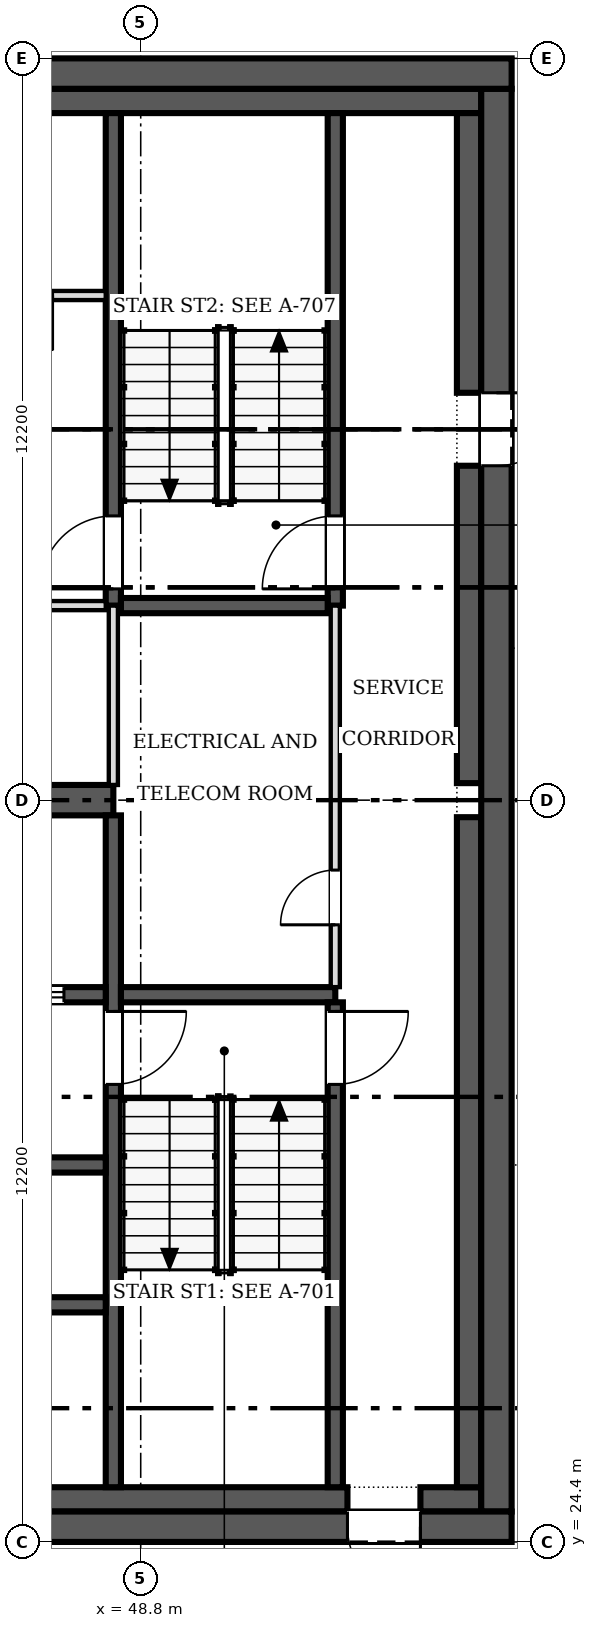
"""IFC4 building model, lengths in metres.
Left out: names, types, materials, properties, quantities, classifications, styles, units other than length and angle.
Written with IfcOpenShell. Run it as: python <this file> out.ifc"""

import sys

from ifc_helpers import new_model, si_unit, direction, frame, frame_2d, origin, place, context, subcontext, project, spatial, rectangle, extrude, source, transform, mapped, element, fill, save


model = new_model("IFC4")
c1 = context("Model", 3, precision=1e-05, world=origin(), true_north=direction((0.0, 1.0)))
c2 = subcontext(c1, "Body", "Model", "MODEL_VIEW")
j1 = project(units=[si_unit("LENGTHUNIT", "METRE"), si_unit("PLANEANGLEUNIT", "RADIAN")], contexts=[c1])
p1 = place(None, origin())
s1 = spatial("IfcSite", under=j1, at=p1, CompositionType="ELEMENT")
p2 = place(p1, origin())
s2 = spatial("IfcBuilding", under=s1, at=p2, CompositionType="ELEMENT")
p3 = place(p2, frame((0.0, 0.0, 216.9)))
s3 = spatial("IfcBuildingStorey", under=s2, at=p3, CompositionType="ELEMENT", Elevation=216.9)
p4 = place(p3, frame((54.9, 24.65, 0.0), z_axis=(0.0, 0.0, 1.0), x_axis=(-1.0, 0.0, 0.0)))
e1 = element("IfcWall", 1, at=p4, inside=s3, PredefinedType="SHEAR", context=c2, shape_type="SweptSolid", body=[
    extrude(rectangle(XDim=24.4, YDim=0.5, at=frame_2d((12.2, 0.0))), origin(), (0.0, 0.0, 1.0), 3.8),
])
m1 = source(origin(), c2, "Body", "SweptSolid", [
    extrude(rectangle(XDim=1.2, YDim=2.1, at=frame_2d((0.6, 1.05))), frame((0.0, 0.26, 0.0), z_axis=(0.0, -1.0, 0.0), x_axis=(1.0, 0.0, 0.0)), (0.0, 0.0, 1.0), 0.52),
])
p5 = place(p4, frame((1.5, 0.0, 0.0)))
e2 = element("IfcOpeningElement", 2, at=p5, cuts=e1, PredefinedType="OPENING", context=c2, shape_type="MappedRepresentation", body=[
    mapped(m1, transform((0.0, 0.0, 0.0), scale=1.0)),
])
p6 = place(p3, frame((30.5, 48.55, 0.0), z_axis=(0.0, 0.0, 1.0), x_axis=(1.0, 0.0, 0.0)))
e3 = element("IfcWall", 3, at=p6, inside=s3, PredefinedType="SHEAR", context=c2, shape_type="SweptSolid", body=[
    extrude(rectangle(XDim=24.4, YDim=0.5, at=frame_2d((12.2, 0.0))), origin(), (0.0, 0.0, 1.0), 3.8),
])
p7 = place(p3, frame((54.65, 48.3, 0.0), z_axis=(0.0, 0.0, 1.0), x_axis=(0.0, -1.0, 0.0)))
e4 = element("IfcWall", 4, at=p7, inside=s3, PredefinedType="SHEAR", context=c2, shape_type="SweptSolid", body=[
    extrude(rectangle(XDim=23.4, YDim=0.5, at=frame_2d((11.7, 0.0))), origin(), (0.0, 0.0, 1.0), 3.8),
])
p8 = place(p7, frame((5.0, 0.0, 0.0)))
e5 = element("IfcOpeningElement", 5, at=p8, cuts=e4, PredefinedType="OPENING", context=c2, shape_type="MappedRepresentation", body=[
    mapped(m1, transform((0.0, 0.0, 0.0), scale=1.0)),
])
p9 = place(p3, frame((31.0, 25.1, 0.0), z_axis=(0.0, 0.0, 1.0), x_axis=(1.0, 0.0, 0.0)))
e6 = element("IfcWall", 6, at=p9, inside=s3, PredefinedType="SOLIDWALL", context=c2, shape_type="SweptSolid", body=[
    extrude(rectangle(XDim=21.2, YDim=0.4, at=frame_2d((10.6, 0.0))), origin(), (0.0, 0.0, 1.0), 3.8),
])
p10 = place(p3, frame((53.4, 25.1, 0.0), z_axis=(0.0, 0.0, 1.0), x_axis=(1.0, 0.0, 0.0)))
e7 = element("IfcWall", 7, at=p10, inside=s3, PredefinedType="SOLIDWALL", context=c2, shape_type="SweptSolid", body=[
    extrude(rectangle(XDim=1.0, YDim=0.4, at=frame_2d((0.5, 0.0))), origin(), (0.0, 0.0, 1.0), 3.8),
])
p11 = place(p3, frame((31.0, 48.1, 0.0), z_axis=(0.0, 0.0, 1.0), x_axis=(1.0, 0.0, 0.0)))
e8 = element("IfcWall", 8, at=p11, inside=s3, PredefinedType="SOLIDWALL", context=c2, shape_type="SweptSolid", body=[
    extrude(rectangle(XDim=23.4, YDim=0.4, at=frame_2d((11.7, 0.0))), origin(), (0.0, 0.0, 1.0), 3.8),
])
p12 = place(p3, frame((54.2, 25.3, 0.0), z_axis=(0.0, 0.0, 1.0), x_axis=(0.0, 1.0, 0.0)))
e9 = element("IfcWall", 9, at=p12, inside=s3, PredefinedType="SOLIDWALL", context=c2, shape_type="SweptSolid", body=[
    extrude(rectangle(XDim=11.02, YDim=0.4, at=frame_2d((5.51, 0.0))), origin(), (0.0, 0.0, 1.0), 3.8),
])
p13 = place(p3, frame((54.2, 36.88, 0.0), z_axis=(0.0, 0.0, 1.0), x_axis=(0.0, 1.0, 0.0)))
e10 = element("IfcWall", 10, at=p13, inside=s3, PredefinedType="SOLIDWALL", context=c2, shape_type="SweptSolid", body=[
    extrude(rectangle(XDim=5.22, YDim=0.4, at=frame_2d((2.61, 0.0))), origin(), (0.0, 0.0, 1.0), 3.8),
])
p14 = place(p3, frame((54.2, 43.3, 0.0), z_axis=(0.0, 0.0, 1.0), x_axis=(0.0, 1.0, 0.0)))
e11 = element("IfcWall", 11, at=p14, inside=s3, PredefinedType="SOLIDWALL", context=c2, shape_type="SweptSolid", body=[
    extrude(rectangle(XDim=4.6, YDim=0.4, at=frame_2d((2.3, 0.0))), origin(), (0.0, 0.0, 1.0), 3.8),
])
p15 = place(p3, frame((31.4, 36.6, 0.0), z_axis=(0.0, 0.0, 1.0), x_axis=(1.0, 0.0, 0.0)))
e12 = element("IfcWall", 12, at=p15, inside=s3, PredefinedType="SHEAR", context=c2, shape_type="SweptSolid", body=[
    extrude(rectangle(XDim=16.95, YDim=0.5, at=frame_2d((8.475, 0.0))), origin(), (0.0, 0.0, 1.0), 3.8),
])
p16 = place(p3, frame((48.35, 36.35, 0.0), z_axis=(0.0, 0.0, 1.0), x_axis=(0.0, -1.0, 0.0)))
e13 = element("IfcWall", 13, at=p16, inside=s3, PredefinedType="SOLIDWALL", context=c2, shape_type="SweptSolid", body=[
    extrude(rectangle(XDim=11.05, YDim=0.25, at=frame_2d((5.525, 0.0))), origin(), (0.0, 0.0, 1.0), 3.8),
])
m2 = source(origin(), c2, "Body", "SweptSolid", [
    extrude(rectangle(XDim=1.2, YDim=2.1, at=frame_2d((0.6, 1.05))), frame((0.0, 0.135, 0.0), z_axis=(0.0, -1.0, 0.0), x_axis=(1.0, 0.0, 0.0)), (0.0, 0.0, 1.0), 0.27),
])
p17 = place(p16, frame((3.225, 0.0, 0.0)))
e14 = element("IfcOpeningElement", 14, at=p17, cuts=e13, PredefinedType="OPENING", context=c2, shape_type="MappedRepresentation", body=[
    mapped(m2, transform((0.0, 0.0, 0.0), scale=1.0)),
])
p18 = place(p3, frame((48.225, 33.4, 0.0), z_axis=(0.0, 0.0, 1.0), x_axis=(-1.0, 0.0, 0.0)))
e15 = element("IfcWall", 15, at=p18, inside=s3, PredefinedType="SOLIDWALL", context=c2, shape_type="SweptSolid", body=[
    extrude(rectangle(XDim=5.275, YDim=0.25, at=frame_2d((2.638, 0.0))), origin(), (0.0, 0.0, 1.0), 3.8),
])
p19 = place(p18, frame((3.512, 0.0, 0.0)))
e16 = element("IfcOpeningElement", 16, at=p19, cuts=e15, PredefinedType="OPENING", context=c2, shape_type="MappedRepresentation", body=[
    mapped(m2, transform((0.0, 0.0, 0.0), scale=1.0)),
])
p20 = place(p18, frame((0.688, 0.0, 0.0)))
e17 = element("IfcOpeningElement", 17, at=p20, cuts=e15, PredefinedType="OPENING", context=c2, shape_type="MappedRepresentation", body=[
    mapped(m2, transform((0.0, 0.0, 0.0), scale=1.0)),
])
p21 = place(p3, frame((48.475, 33.4, 0.0), z_axis=(0.0, 0.0, 1.0), x_axis=(1.0, 0.0, 0.0)))
e18 = element("IfcWall", 18, at=p21, inside=s3, PredefinedType="SOLIDWALL", context=c2, shape_type="SweptSolid", body=[
    extrude(rectangle(XDim=3.525, YDim=0.25, at=frame_2d((1.762, 0.0))), origin(), (0.0, 0.0, 1.0), 3.8),
])
p22 = place(p3, frame((48.35, 47.9, 0.0), z_axis=(0.0, 0.0, 1.0), x_axis=(0.0, -1.0, 0.0)))
e19 = element("IfcWall", 19, at=p22, inside=s3, PredefinedType="SOLIDWALL", context=c2, shape_type="SweptSolid", body=[
    extrude(rectangle(XDim=8.1, YDim=0.25, at=frame_2d((4.05, 0.0))), origin(), (0.0, 0.0, 1.0), 3.8),
])
p23 = place(p22, frame((6.625, 0.0, 0.0)))
e20 = element("IfcOpeningElement", 20, at=p23, cuts=e19, PredefinedType="OPENING", context=c2, shape_type="MappedRepresentation", body=[
    mapped(m2, transform((0.0, 0.0, 0.0), scale=1.0)),
])
p24 = place(p3, frame((52.0, 25.3, 0.0), z_axis=(0.0, 0.0, 1.0), x_axis=(0.0, 1.0, 0.0)))
e21 = element("IfcWall", 21, at=p24, inside=s3, PredefinedType="SOLIDWALL", context=c2, shape_type="SweptSolid", body=[
    extrude(rectangle(XDim=7.975, YDim=0.25, at=frame_2d((3.987, 0.0))), origin(), (0.0, 0.0, 1.0), 3.8),
])
p25 = place(p24, frame((6.625, 0.0, 0.0)))
e22 = element("IfcOpeningElement", 22, at=p25, cuts=e21, PredefinedType="OPENING", context=c2, shape_type="MappedRepresentation", body=[
    mapped(m2, transform((0.0, 0.0, 0.0), scale=1.0)),
])
p26 = place(p3, frame((52.0, 39.8, 0.0), z_axis=(0.0, 0.0, 1.0), x_axis=(0.0, 1.0, 0.0)))
e23 = element("IfcWall", 23, at=p26, inside=s3, PredefinedType="SOLIDWALL", context=c2, shape_type="SweptSolid", body=[
    extrude(rectangle(XDim=8.1, YDim=0.25, at=frame_2d((4.05, 0.0))), origin(), (0.0, 0.0, 1.0), 3.8),
])
p27 = place(p26, frame((0.275, 0.0, 0.0)))
e24 = element("IfcOpeningElement", 24, at=p27, cuts=e23, PredefinedType="OPENING", context=c2, shape_type="MappedRepresentation", body=[
    mapped(m2, transform((0.0, 0.0, 0.0), scale=1.0)),
])
for number, where, z_axis, x_axis in (
    (25, (42.95, 28.3, 0.0), (0.0, 0.0, 1.0), (1.0, 0.0, 0.0)),
    (26, (42.95, 30.6, 0.0), (0.0, 0.0, 1.0), (1.0, 0.0, 0.0)),
):
    element("IfcWall", number, at=place(p3, frame(where, z_axis=z_axis, x_axis=x_axis)), inside=s3, PredefinedType="SOLIDWALL", context=c2, shape_type="SweptSolid", body=[
        extrude(rectangle(XDim=5.275, YDim=0.25, at=frame_2d((2.638, 0.0))), origin(), (0.0, 0.0, 1.0), 3.8),
    ])
p28 = place(p3, frame((48.475, 39.8, 0.0), z_axis=(0.0, 0.0, 1.0), x_axis=(1.0, 0.0, 0.0)))
e27 = element("IfcWall", 27, at=p28, inside=s3, PredefinedType="SOLIDWALL", context=c2, shape_type="SweptSolid", body=[
    extrude(rectangle(XDim=3.4, YDim=0.25, at=frame_2d((1.7, 0.0))), origin(), (0.0, 0.0, 1.0), 3.8),
])
p29 = place(p3, frame((52.0, 33.525, 0.0), z_axis=(0.0, 0.0, 1.0), x_axis=(0.0, 1.0, 0.0)))
e28 = element("IfcWall", 28, at=p29, inside=s3, PredefinedType="PARTITIONING", context=c2, shape_type="SweptSolid", body=[
    extrude(rectangle(XDim=6.275, YDim=0.15, at=frame_2d((3.138, 0.0))), origin(), (0.0, 0.0, 1.0), 3.6),
])
m3 = source(origin(), c2, "Body", "SweptSolid", [
    extrude(rectangle(XDim=0.9, YDim=2.1, at=frame_2d((0.45, 1.05))), frame((0.0, 0.085, 0.0), z_axis=(0.0, -1.0, 0.0), x_axis=(1.0, 0.0, 0.0)), (0.0, 0.0, 1.0), 0.17),
])
p30 = place(p29, frame((1.025, 0.0, 0.0)))
e29 = element("IfcOpeningElement", 29, at=p30, cuts=e28, PredefinedType="OPENING", context=c2, shape_type="MappedRepresentation", body=[
    mapped(m3, transform((0.0, 0.0, 0.0), scale=1.0)),
])
p31 = place(p3, frame((48.225, 39.8, 0.0), z_axis=(0.0, 0.0, 1.0), x_axis=(-1.0, 0.0, 0.0)))
e30 = element("IfcWall", 30, at=p31, inside=s3, PredefinedType="PARTITIONING", context=c2, shape_type="SweptSolid", body=[
    extrude(rectangle(XDim=5.275, YDim=0.15, at=frame_2d((2.638, 0.0))), origin(), (0.0, 0.0, 1.0), 3.6),
])
p32 = place(p31, frame((2.25, 0.0, 0.0)))
e31 = element("IfcOpeningElement", 31, at=p32, cuts=e30, PredefinedType="OPENING", context=c2, shape_type="MappedRepresentation", body=[
    mapped(m3, transform((0.0, 0.0, 0.0), scale=1.0)),
])
p33 = place(p3, frame((42.95, 44.9, 0.0), z_axis=(0.0, 0.0, 1.0), x_axis=(1.0, 0.0, 0.0)))
e32 = element("IfcWall", 32, at=p33, inside=s3, PredefinedType="PARTITIONING", context=c2, shape_type="SweptSolid", body=[
    extrude(rectangle(XDim=5.275, YDim=0.15, at=frame_2d((2.638, 0.0))), origin(), (0.0, 0.0, 1.0), 3.6),
])
p34 = place(p33, frame((0.712, 0.0, 0.0)))
e33 = element("IfcOpeningElement", 33, at=p34, cuts=e32, PredefinedType="OPENING", context=c2, shape_type="MappedRepresentation", body=[
    mapped(m3, transform((0.0, 0.0, 0.0), scale=1.0)),
])
p35 = place(p33, frame((3.5, 0.0, 0.0)))
e34 = element("IfcOpeningElement", 34, at=p35, cuts=e32, PredefinedType="OPENING", context=c2, shape_type="MappedRepresentation", body=[
    mapped(m3, transform((0.0, 0.0, 0.0), scale=1.0)),
])
p36 = place(p3, frame((48.35, 36.85, 0.0), z_axis=(0.0, 0.0, 1.0), x_axis=(0.0, 1.0, 0.0)))
e35 = element("IfcWall", 35, at=p36, inside=s3, PredefinedType="PARTITIONING", context=c2, shape_type="SweptSolid", body=[
    extrude(rectangle(XDim=2.95, YDim=0.15, at=frame_2d((1.475, 0.0))), origin(), (0.0, 0.0, 1.0), 3.6),
])
m4 = source(origin(), c2, "Body", "SweptSolid", [
    extrude(rectangle(XDim=1.2, YDim=2.1, at=frame_2d((0.6, 1.05))), frame((0.0, 0.025, 0.0), z_axis=(0.0, -1.0, 0.0), x_axis=(1.0, 0.0, 0.0)), (0.0, 0.0, 1.0), 0.05),
])
p37 = place(p5, origin())
e36 = element("IfcDoor", 36, at=p37, inside=s3, OperationType="SINGLE_SWING_LEFT", PredefinedType="DOOR", context=c2, shape_type="MappedRepresentation", body=[
    mapped(m4, transform((0.0, 0.0, 0.0), scale=1.0)),
])
fill(e2, e36)
p38 = place(p8, origin())
e37 = element("IfcDoor", 37, at=p38, inside=s3, OperationType="SINGLE_SWING_LEFT", PredefinedType="DOOR", context=c2, shape_type="MappedRepresentation", body=[
    mapped(m4, transform((0.0, 0.0, 0.0), scale=1.0)),
])
fill(e5, e37)
p39 = place(p17, origin())
e38 = element("IfcDoor", 38, at=p39, inside=s3, OperationType="SINGLE_SWING_LEFT", PredefinedType="DOOR", context=c2, shape_type="MappedRepresentation", body=[
    mapped(m4, transform((0.0, 0.0, 0.0), scale=1.0)),
])
fill(e14, e38)
p40 = place(p20, origin())
e39 = element("IfcDoor", 39, at=p40, inside=s3, OperationType="DOUBLE_DOOR_SLIDING", PredefinedType="DOOR", context=c2, shape_type="MappedRepresentation", body=[
    mapped(m4, transform((0.0, 0.0, 0.0), scale=1.0)),
])
fill(e17, e39)
p41 = place(p23, origin())
e40 = element("IfcDoor", 40, at=p41, inside=s3, OperationType="SINGLE_SWING_RIGHT", PredefinedType="DOOR", context=c2, shape_type="MappedRepresentation", body=[
    mapped(m4, transform((0.0, 0.0, 0.0), scale=1.0)),
])
fill(e20, e40)
p42 = place(p25, origin())
e41 = element("IfcDoor", 41, at=p42, inside=s3, OperationType="SINGLE_SWING_RIGHT", PredefinedType="DOOR", context=c2, shape_type="MappedRepresentation", body=[
    mapped(m4, transform((0.0, 0.0, 0.0), scale=1.0)),
])
fill(e22, e41)
p43 = place(p27, origin())
e42 = element("IfcDoor", 42, at=p43, inside=s3, OperationType="SINGLE_SWING_LEFT", PredefinedType="DOOR", context=c2, shape_type="MappedRepresentation", body=[
    mapped(m4, transform((0.0, 0.0, 0.0), scale=1.0)),
])
fill(e24, e42)
m5 = source(origin(), c2, "Body", "SweptSolid", [
    extrude(rectangle(XDim=0.9, YDim=2.1, at=frame_2d((0.45, 1.05))), frame((0.0, 0.025, 0.0), z_axis=(0.0, -1.0, 0.0), x_axis=(1.0, 0.0, 0.0)), (0.0, 0.0, 1.0), 0.05),
])
p44 = place(p30, origin())
e43 = element("IfcDoor", 43, at=p44, inside=s3, OperationType="SINGLE_SWING_LEFT", PredefinedType="DOOR", context=c2, shape_type="MappedRepresentation", body=[
    mapped(m5, transform((0.0, 0.0, 0.0), scale=1.0)),
])
fill(e29, e43)
save(model, sys.argv[1])
